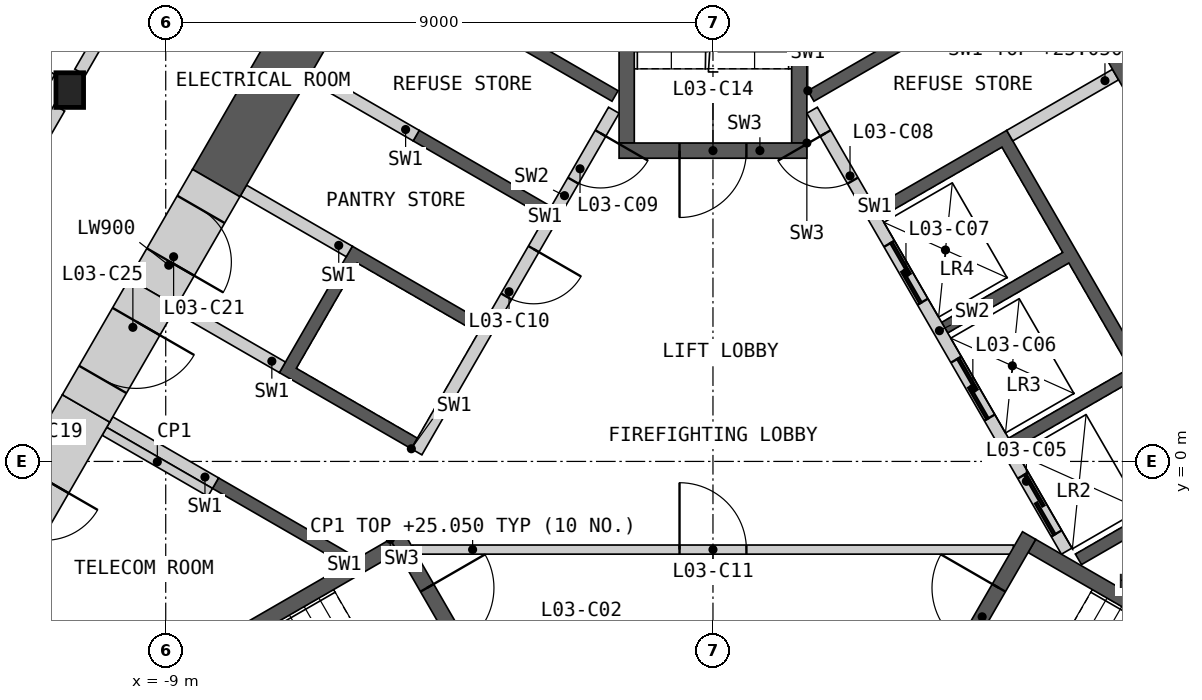
"""IFC4 building model, lengths in metres.
Left out: names, types, materials, properties, quantities, classifications, styles, units other than length and angle.
Written with IfcOpenShell. Run it as: python <this file> out.ifc"""

import sys

from ifc_helpers import new_model, si_unit, direction, frame, frame_2d, origin, origin_2d, place, context, subcontext, project, spatial, polyline, rectangle, i_section, outline, extrude, element, fill, save


model = new_model("IFC4")
c1 = context("Model", 3, precision=1e-05, world=origin(), true_north=direction((0.0, 1.0)))
c2 = subcontext(c1, "Body", "Model", "MODEL_VIEW")
j1 = project(units=[si_unit("LENGTHUNIT", "METRE"), si_unit("PLANEANGLEUNIT", "RADIAN")], contexts=[c1])
p1 = place(None, origin())
s1 = spatial("IfcSite", under=j1, at=p1, CompositionType="ELEMENT")
p2 = place(p1, origin())
s2 = spatial("IfcBuilding", under=s1, at=p2, CompositionType="ELEMENT")
p3 = place(p2, frame((0.0, 0.0, 21.0)))
s3 = spatial("IfcBuildingStorey", under=s2, at=p3, CompositionType="ELEMENT", Elevation=21.0)
p4 = place(p3, frame((-10.578, 6.107, 0.0), z_axis=(0.0, 0.0, 1.0), x_axis=(1.0, 0.0, 0.0)))
e1 = element("IfcColumn", 1, at=p4, inside=s3, PredefinedType="COLUMN", context=c2, shape_type="SweptSolid", body=[
    extrude(i_section(OverallWidth=0.454, OverallDepth=0.57, WebThickness=0.078, FlangeThickness=0.125, at=origin_2d()), origin(), (0.0, 0.0, 1.0), 4.5),
])
p5 = place(p3, origin())
e2 = element("IfcWall", 2, at=p5, inside=s3, PredefinedType="SHEAR", context=c2, shape_type="SweptSolid", body=[
    extrude(outline(polyline([(1.561, 6.097), (3.731, 7.35), (3.831, 7.177), (1.66, 5.924), (1.561, 6.097)])), origin(), (0.0, 0.0, 1.0), 4.05),
])
p6 = place(p3, origin())
e3 = element("IfcWall", 3, at=p6, inside=s3, PredefinedType="SHEAR", context=c2, shape_type="SweptSolid", body=[
    extrude(outline(polyline([(2.66, 4.192), (4.831, 5.445), (8.231, -0.444), (6.061, -1.697), (5.96, -1.524), (7.952, -0.374), (6.952, 1.358), (4.96, 0.208), (4.861, 0.381), (6.852, 1.531), (5.852, 3.263), (3.861, 2.113), (3.76, 2.287), (5.752, 3.437), (4.752, 5.169), (2.76, 4.019), (2.66, 4.192)])), origin(), (0.0, 0.0, 1.0), 4.05),
])
p7 = place(p3, frame((5.817, -1.476, 0.0), z_axis=(0.0, 0.0, 1.0), x_axis=(-0.500002616675, 0.866023893041, 0.0)))
e4 = element("IfcWall", 4, at=p7, inside=s3, PredefinedType="SOLIDWALL", context=c2, shape_type="SweptSolid", body=[
    extrude(rectangle(XDim=8.373, YDim=0.2, at=frame_2d((4.187, 0.0))), origin(), (0.0, 0.0, 1.0), 4.05),
])
p8 = place(p7, frame((0.337, 0.0, 0.0)))
e5 = element("IfcOpeningElement", 5, at=p8, cuts=e4, PredefinedType="OPENING", context=c2, shape_type="SweptSolid", body=[
    extrude(rectangle(XDim=1.1, YDim=2.1, at=frame_2d((0.55, 1.05))), frame((0.0, 0.11, 0.0), z_axis=(0.0, -1.0, 0.0), x_axis=(1.0, 0.0, 0.0)), (0.0, 0.0, 1.0), 0.22),
])
p9 = place(p7, frame((2.537, 0.0, 0.0)))
e6 = element("IfcOpeningElement", 6, at=p9, cuts=e4, PredefinedType="OPENING", context=c2, shape_type="SweptSolid", body=[
    extrude(rectangle(XDim=1.1, YDim=2.1, at=frame_2d((0.55, 1.05))), frame((0.0, 0.11, 0.0), z_axis=(0.0, -1.0, 0.0), x_axis=(1.0, 0.0, 0.0)), (0.0, 0.0, 1.0), 0.22),
])
p10 = place(p7, frame((4.737, 0.0, 0.0)))
e7 = element("IfcOpeningElement", 7, at=p10, cuts=e4, PredefinedType="OPENING", context=c2, shape_type="SweptSolid", body=[
    extrude(rectangle(XDim=1.1, YDim=2.1, at=frame_2d((0.55, 1.05))), frame((0.0, 0.11, 0.0), z_axis=(0.0, -1.0, 0.0), x_axis=(1.0, 0.0, 0.0)), (0.0, 0.0, 1.0), 0.22),
])
p11 = place(p7, frame((7.037, 0.0, 0.0)))
e8 = element("IfcOpeningElement", 8, at=p11, cuts=e4, PredefinedType="OPENING", context=c2, shape_type="SweptSolid", body=[
    extrude(rectangle(XDim=0.9, YDim=2.1, at=frame_2d((0.45, 1.05))), frame((0.0, 0.11, 0.0), z_axis=(0.0, -1.0, 0.0), x_axis=(1.0, 0.0, 0.0)), (0.0, 0.0, 1.0), 0.22),
])
p12 = place(p3, frame((4.881, 5.358, 0.0), z_axis=(0.0, 0.0, 1.0), x_axis=(0.866035824272, 0.499981950752, 0.0)))
e9 = element("IfcWall", 9, at=p12, inside=s3, PredefinedType="SHEAR", context=c2, shape_type="SweptSolid", body=[
    extrude(rectangle(XDim=2.009, YDim=0.2, at=frame_2d((1.004, 0.0))), origin(), (0.0, 0.0, 1.0), 4.05),
])
p13 = place(p3, origin())
e10 = element("IfcWall", 10, at=p13, inside=s3, PredefinedType="SHEAR", context=c2, shape_type="SweptSolid", body=[
    extrude(outline(polyline([(-6.061, -1.697), (-8.231, -0.444), (-8.131, -0.271), (-5.96, -1.524), (-6.061, -1.697)])), origin(), (0.0, 0.0, 1.0), 4.05),
])
p14 = place(p3, origin())
e11 = element("IfcWall", 11, at=p14, inside=s3, PredefinedType="SHEAR", context=c2, shape_type="SweptSolid", body=[
    extrude(outline(polyline([(-4.96, 0.208), (-7.131, 1.461), (-5.931, 3.54), (-3.76, 2.287), (-3.861, 2.113), (-5.852, 3.263), (-6.852, 1.531), (-4.861, 0.381), (-4.96, 0.208)])), origin(), (0.0, 0.0, 1.0), 4.05),
])
p15 = place(p3, origin())
e12 = element("IfcWall", 12, at=p15, inside=s3, PredefinedType="SHEAR", context=c2, shape_type="SweptSolid", body=[
    extrude(outline(polyline([(-2.76, 4.019), (-4.931, 5.272), (-4.831, 5.445), (-2.66, 4.192), (-2.76, 4.019)])), origin(), (0.0, 0.0, 1.0), 4.05),
])
p16 = place(p3, origin())
e13 = element("IfcWall", 13, at=p16, inside=s3, PredefinedType="SHEAR", context=c2, shape_type="SweptSolid", body=[
    extrude(outline(polyline([(-3.731, 7.35), (-1.561, 6.097), (-1.66, 5.924), (-3.831, 7.177), (-3.731, 7.35)])), origin(), (0.0, 0.0, 1.0), 4.05),
])
p17 = place(p3, frame((-1.631, 5.776, 0.0), z_axis=(0.0, 0.0, 1.0), x_axis=(-0.499992876559, -0.866029516466, 0.0)))
e14 = element("IfcWall", 14, at=p17, inside=s3, PredefinedType="SOLIDWALL", context=c2, shape_type="SweptSolid", body=[
    extrude(rectangle(XDim=6.486, YDim=0.2, at=frame_2d((3.243, 0.0))), origin(), (0.0, 0.0, 1.0), 4.05),
])
p18 = place(p17, frame((0.437, 0.0, 0.0)))
e15 = element("IfcOpeningElement", 15, at=p18, cuts=e14, PredefinedType="OPENING", context=c2, shape_type="SweptSolid", body=[
    extrude(rectangle(XDim=0.9, YDim=2.1, at=frame_2d((0.45, 1.05))), frame((0.0, 0.11, 0.0), z_axis=(0.0, -1.0, 0.0), x_axis=(1.0, 0.0, 0.0)), (0.0, 0.0, 1.0), 0.22),
])
p19 = place(p17, frame((2.637, 0.0, 0.0)))
e16 = element("IfcOpeningElement", 16, at=p19, cuts=e14, PredefinedType="OPENING", context=c2, shape_type="SweptSolid", body=[
    extrude(rectangle(XDim=0.9, YDim=2.1, at=frame_2d((0.45, 1.05))), frame((0.0, 0.11, 0.0), z_axis=(0.0, -1.0, 0.0), x_axis=(1.0, 0.0, 0.0)), (0.0, 0.0, 1.0), 0.22),
])
p20 = place(p3, frame((-4.881, 5.358, 0.0), z_axis=(0.0, 0.0, 1.0), x_axis=(-0.866035824272, 0.499981950752, 0.0)))
e17 = element("IfcWall", 17, at=p20, inside=s3, PredefinedType="SHEAR", context=c2, shape_type="SweptSolid", body=[
    extrude(rectangle(XDim=2.009, YDim=0.2, at=frame_2d((1.004, 0.0))), origin(), (0.0, 0.0, 1.0), 4.05),
])
p21 = place(p3, frame((-5.981, 3.453, 0.0), z_axis=(0.0, 0.0, 1.0), x_axis=(-0.866013584312, 0.500020471368, 0.0)))
e18 = element("IfcWall", 18, at=p21, inside=s3, PredefinedType="SHEAR", context=c2, shape_type="SweptSolid", body=[
    extrude(rectangle(XDim=2.009, YDim=0.2, at=frame_2d((1.005, 0.0))), origin(), (0.0, 0.0, 1.0), 4.05),
])
p22 = place(p3, frame((-7.081, 1.548, 0.0), z_axis=(0.0, 0.0, 1.0), x_axis=(-0.865983199114, 0.50007309351, 0.0)))
e19 = element("IfcWall", 19, at=p22, inside=s3, PredefinedType="SHEAR", context=c2, shape_type="SweptSolid", body=[
    extrude(rectangle(XDim=2.009, YDim=0.2, at=frame_2d((1.004, 0.0))), origin(), (0.0, 0.0, 1.0), 4.05),
])
p23 = place(p3, frame((-8.181, -0.357, 0.0), z_axis=(0.0, 0.0, 1.0), x_axis=(-0.866035824272, 0.499981950752, 0.0)))
e20 = element("IfcWall", 20, at=p23, inside=s3, PredefinedType="SHEAR", context=c2, shape_type="SweptSolid", body=[
    extrude(rectangle(XDim=2.009, YDim=0.2, at=frame_2d((1.004, 0.0))), origin(), (0.0, 0.0, 1.0), 4.05),
])
p24 = place(p3, frame((-4.941, -1.45, 0.0), z_axis=(0.0, 0.0, 1.0), x_axis=(1.0, 0.0, 0.0)))
e21 = element("IfcWall", 21, at=p24, inside=s3, PredefinedType="PARTITIONING", context=c2, shape_type="SweptSolid", body=[
    extrude(rectangle(XDim=9.882, YDim=0.15, at=frame_2d((4.941, 0.0))), origin(), (0.0, 0.0, 1.0), 4.05),
])
p25 = place(p24, frame((4.391, 0.0, 0.0)))
e22 = element("IfcOpeningElement", 22, at=p25, cuts=e21, PredefinedType="OPENING", context=c2, shape_type="SweptSolid", body=[
    extrude(rectangle(XDim=1.1, YDim=2.1, at=frame_2d((0.55, 1.05))), frame((0.0, 0.085, 0.0), z_axis=(0.0, -1.0, 0.0), x_axis=(1.0, 0.0, 0.0)), (0.0, 0.0, 1.0), 0.17),
])
p26 = place(p3, origin())
e23 = element("IfcWall", 23, at=p26, inside=s3, PredefinedType="SHEAR", context=c2, shape_type="SweptSolid", body=[
    extrude(outline(polyline([(-5.307, -1.281), (-10.374, -4.206), (-10.032, -4.298), (-5.182, -1.498), (-5.307, -1.281)])), origin(), (0.0, 0.0, 1.0), 4.05),
])
p27 = place(p3, frame((-5.199, -1.219, 0.0), z_axis=(0.0, 0.0, 1.0), x_axis=(0.499982516597, -0.866035497597, 0.0)))
e24 = element("IfcWall", 24, at=p27, inside=s3, PredefinedType="SHEAR", context=c2, shape_type="SweptSolid", body=[
    extrude(rectangle(XDim=3.088, YDim=0.25, at=frame_2d((1.544, 0.0))), origin(), (0.0, 0.0, 1.0), 4.05),
])
p28 = place(p27, frame((0.994, 0.0, 0.0)))
e25 = element("IfcOpeningElement", 25, at=p28, cuts=e24, PredefinedType="OPENING", context=c2, shape_type="SweptSolid", body=[
    extrude(rectangle(XDim=1.1, YDim=2.1, at=frame_2d((0.55, 1.05))), frame((0.0, 0.135, 0.0), z_axis=(0.0, -1.0, 0.0), x_axis=(1.0, 0.0, 0.0)), (0.0, 0.0, 1.0), 0.27),
])
p29 = place(p3, origin())
e26 = element("IfcWall", 26, at=p29, inside=s3, PredefinedType="SHEAR", context=c2, shape_type="SweptSolid", body=[
    extrude(outline(polyline([(10.032, -4.298), (10.374, -4.206), (5.307, -1.281), (5.182, -1.498), (10.032, -4.298)])), origin(), (0.0, 0.0, 1.0), 4.05),
])
p30 = place(p3, frame((3.655, -3.893, 0.0), z_axis=(0.0, 0.0, 1.0), x_axis=(0.499982516597, 0.866035497597, 0.0)))
e27 = element("IfcWall", 27, at=p30, inside=s3, PredefinedType="SHEAR", context=c2, shape_type="SweptSolid", body=[
    extrude(rectangle(XDim=3.088, YDim=0.25, at=frame_2d((1.544, 0.0))), origin(), (0.0, 0.0, 1.0), 4.05),
])
p31 = place(p30, frame((0.994, 0.0, 0.0)))
e28 = element("IfcOpeningElement", 28, at=p31, cuts=e27, PredefinedType="OPENING", context=c2, shape_type="SweptSolid", body=[
    extrude(rectangle(XDim=1.1, YDim=2.1, at=frame_2d((0.55, 1.05))), frame((0.0, 0.135, 0.0), z_axis=(0.0, -1.0, 0.0), x_axis=(1.0, 0.0, 0.0)), (0.0, 0.0, 1.0), 0.27),
])
p32 = place(p3, origin())
e29 = element("IfcWall", 29, at=p32, inside=s3, PredefinedType="SHEAR", context=c2, shape_type="SweptSolid", body=[
    extrude(outline(polyline([(1.544, 5.237), (1.544, 11.087), (1.294, 10.837), (1.294, 5.237), (1.544, 5.237)])), origin(), (0.0, 0.0, 1.0), 4.05),
])
p33 = place(p3, origin())
e30 = element("IfcWall", 30, at=p33, inside=s3, PredefinedType="SHEAR", context=c2, shape_type="SweptSolid", body=[
    extrude(outline(polyline([(-1.294, 10.837), (-1.544, 11.087), (-1.544, 5.237), (-1.294, 5.237), (-1.294, 10.837)])), origin(), (0.0, 0.0, 1.0), 4.05),
])
p34 = place(p3, frame((1.544, 5.112, 0.0), z_axis=(0.0, 0.0, 1.0), x_axis=(-1.0, 0.0, 0.0)))
e31 = element("IfcWall", 31, at=p34, inside=s3, PredefinedType="SHEAR", context=c2, shape_type="SweptSolid", body=[
    extrude(rectangle(XDim=3.088, YDim=0.25, at=frame_2d((1.544, 0.0))), origin(), (0.0, 0.0, 1.0), 4.05),
])
p35 = place(p34, frame((0.994, 0.0, 0.0)))
e32 = element("IfcOpeningElement", 32, at=p35, cuts=e31, PredefinedType="OPENING", context=c2, shape_type="SweptSolid", body=[
    extrude(rectangle(XDim=1.1, YDim=2.1, at=frame_2d((0.55, 1.05))), frame((0.0, 0.135, 0.0), z_axis=(0.0, -1.0, 0.0), x_axis=(1.0, 0.0, 0.0)), (0.0, 0.0, 1.0), 0.27),
])
p36 = place(p3, frame((-8.268, -0.509, 0.0), z_axis=(0.0, 0.0, 1.0), x_axis=(-0.866035824272, 0.499981950752, 0.0)))
e33 = element("IfcWall", 33, at=p36, inside=s3, PredefinedType="PARTITIONING", context=c2, shape_type="SweptSolid", body=[
    extrude(rectangle(XDim=2.009, YDim=0.15, at=frame_2d((1.004, 0.0))), origin(), (0.0, 0.0, 1.0), 4.05),
])
p37 = place(p3, frame((-11.664, -2.373, 0.0), z_axis=(0.0, 0.0, 1.0), x_axis=(0.866075643493, -0.499912972175, 0.0)))
e34 = element("IfcWall", 34, at=p37, inside=s3, PredefinedType="PARTITIONING", context=c2, shape_type="SweptSolid", body=[
    extrude(rectangle(XDim=2.588, YDim=0.15, at=frame_2d((1.294, 0.0))), origin(), (0.0, 0.0, 1.0), 4.05),
])
p38 = place(p3, frame((9.561, 2.169, 0.0), z_axis=(0.0, 0.0, 1.0), x_axis=(-0.499995114243, 0.866028224559, 0.0)))
e35 = element("IfcWall", 35, at=p38, inside=s3, PredefinedType="SHEAR", context=c2, shape_type="SweptSolid", body=[
    extrude(rectangle(XDim=7.906, YDim=0.9, at=frame_2d((3.953, 0.0))), origin(), (0.0, 0.0, 1.0), 4.05),
])
p39 = place(p3, frame((-4.466, 10.995, 0.0), z_axis=(0.0, 0.0, 1.0), x_axis=(-0.500012427149, -0.866018228848, 0.0)))
e36 = element("IfcWall", 36, at=p39, inside=s3, PredefinedType="SHEAR", context=c2, shape_type="SweptSolid", body=[
    extrude(rectangle(XDim=7.409, YDim=0.9, at=frame_2d((3.705, 0.0))), origin(), (0.0, 0.0, 1.0), 4.05),
])
p40 = place(p3, frame((-10.31, 0.872, 0.0), z_axis=(0.0, 0.0, 1.0), x_axis=(-0.499982003349, -0.866035793907, 0.0)))
e37 = element("IfcWall", 37, at=p40, inside=s3, PredefinedType="SHEAR", context=c2, shape_type="SweptSolid", body=[
    extrude(rectangle(XDim=2.931, YDim=0.9, at=frame_2d((1.466, 0.0))), origin(), (0.0, 0.0, 1.0), 4.05),
])
p41 = place(p40, frame((1.35, 0.0, 0.0)))
e38 = element("IfcOpeningElement", 38, at=p41, cuts=e37, PredefinedType="OPENING", context=c2, shape_type="SweptSolid", body=[
    extrude(rectangle(XDim=1.0, YDim=2.1, at=frame_2d((0.5, 1.05))), frame((0.0, 0.46, 0.0), z_axis=(0.0, -1.0, 0.0), x_axis=(1.0, 0.0, 0.0)), (0.0, 0.0, 1.0), 0.92),
])
p42 = place(p3, frame((-8.17, 4.579, 0.0), z_axis=(0.0, 0.0, 1.0), x_axis=(-0.499888406853, -0.866089822532, 0.0)))
e39 = element("IfcWall", 39, at=p42, inside=s3, PredefinedType="SHEAR", context=c2, shape_type="SweptSolid", body=[
    extrude(rectangle(XDim=2.08, YDim=0.9, at=frame_2d((1.04, 0.0))), origin(), (0.0, 0.0, 1.0), 4.05),
])
p43 = place(p42, frame((0.5, 0.0, 0.0)))
e40 = element("IfcOpeningElement", 40, at=p43, cuts=e39, PredefinedType="OPENING", context=c2, shape_type="SweptSolid", body=[
    extrude(rectangle(XDim=1.0, YDim=2.1, at=frame_2d((0.5, 1.05))), frame((0.0, 0.46, 0.0), z_axis=(0.0, -1.0, 0.0), x_axis=(1.0, 0.0, 0.0)), (0.0, 0.0, 1.0), 0.92),
])
p44 = place(p3, frame((-9.21, 2.777, 0.0), z_axis=(0.0, 0.0, 1.0), x_axis=(-0.500077893725, -0.86598042715, 0.0)))
e41 = element("IfcWall", 41, at=p44, inside=s3, PredefinedType="SHEAR", context=c2, shape_type="SweptSolid", body=[
    extrude(rectangle(XDim=2.2, YDim=0.9, at=frame_2d((1.1, 0.0))), origin(), (0.0, 0.0, 1.0), 4.05),
])
p45 = place(p44, frame((0.55, 0.0, 0.0)))
e42 = element("IfcOpeningElement", 42, at=p45, cuts=e41, PredefinedType="OPENING", context=c2, shape_type="SweptSolid", body=[
    extrude(rectangle(XDim=1.1, YDim=2.1, at=frame_2d((0.55, 1.05))), frame((0.0, 0.46, 0.0), z_axis=(0.0, -1.0, 0.0), x_axis=(1.0, 0.0, 0.0)), (0.0, 0.0, 1.0), 0.92),
])
p46 = place(p3, frame((-15.698, -2.759, 0.0), z_axis=(0.0, 0.0, 1.0), x_axis=(0.500004292778, 0.866022925334, 0.0)))
e43 = element("IfcWall", 43, at=p46, inside=s3, PredefinedType="PARTITIONING", context=c2, shape_type="SweptSolid", body=[
    extrude(rectangle(XDim=9.898, YDim=0.2, at=frame_2d((4.949, 0.0))), origin(), (0.0, 0.0, 1.0), 4.05),
])
p47 = place(p46, frame((4.1, 0.0, 0.0)))
e44 = element("IfcOpeningElement", 44, at=p47, cuts=e43, PredefinedType="OPENING", context=c2, shape_type="SweptSolid", body=[
    extrude(rectangle(XDim=1.8, YDim=2.1, at=frame_2d((0.9, 1.05))), frame((0.0, 0.11, 0.0), z_axis=(0.0, -1.0, 0.0), x_axis=(1.0, 0.0, 0.0)), (0.0, 0.0, 1.0), 0.22),
])
p48 = place(p3, frame((5.459, 14.974, 0.0), z_axis=(0.0, 0.0, 1.0), x_axis=(0.499985793049, -0.866033606016, 0.0)))
e45 = element("IfcWall", 45, at=p48, inside=s3, PredefinedType="PARTITIONING", context=c2, shape_type="SweptSolid", body=[
    extrude(rectangle(XDim=9.898, YDim=0.2, at=frame_2d((4.949, 0.0))), origin(), (0.0, 0.0, 1.0), 4.05),
])
p49 = place(p48, frame((3.998, 0.0, 0.0)))
e46 = element("IfcOpeningElement", 46, at=p49, cuts=e45, PredefinedType="OPENING", context=c2, shape_type="SweptSolid", body=[
    extrude(rectangle(XDim=1.8, YDim=2.1, at=frame_2d((0.9, 1.05))), frame((0.0, 0.11, 0.0), z_axis=(0.0, -1.0, 0.0), x_axis=(1.0, 0.0, 0.0)), (0.0, 0.0, 1.0), 0.22),
])
p50 = place(p3, frame((-10.408, 6.402, 0.0), z_axis=(0.0, 0.0, 1.0), x_axis=(0.499986904098, 0.866032964575, 0.0)))
e47 = element("IfcWall", 47, at=p50, inside=s3, PredefinedType="PARTITIONING", context=c2, shape_type="SweptSolid", body=[
    extrude(rectangle(XDim=9.67, YDim=0.2, at=frame_2d((4.835, 0.0))), origin(), (0.0, 0.0, 1.0), 4.05),
])
p51 = place(p50, frame((3.884, 0.0, 0.0)))
e48 = element("IfcOpeningElement", 48, at=p51, cuts=e47, PredefinedType="OPENING", context=c2, shape_type="SweptSolid", body=[
    extrude(rectangle(XDim=1.8, YDim=2.1, at=frame_2d((0.9, 1.05))), frame((0.0, 0.11, 0.0), z_axis=(0.0, -1.0, 0.0), x_axis=(1.0, 0.0, 0.0)), (0.0, 0.0, 1.0), 0.22),
])
p52 = place(p3, frame((-19.31, 11.148, 0.0), z_axis=(0.0, 0.0, 1.0), x_axis=(0.866029077831, -0.499993636311, 0.0)))
e49 = element("IfcWall", 49, at=p52, inside=s3, PredefinedType="PARTITIONING", context=c2, shape_type="SweptSolid", body=[
    extrude(rectangle(XDim=9.741, YDim=0.2, at=frame_2d((4.871, 0.0))), origin(), (0.0, 0.0, 1.0), 4.05),
])
p53 = place(p8, origin())
e50 = element("IfcDoor", 50, at=p53, inside=s3, OperationType="SLIDING_TO_LEFT", PredefinedType="DOOR", context=c2, shape_type="SweptSolid", body=[
    extrude(rectangle(XDim=1.1, YDim=2.1, at=frame_2d((0.55, 1.05))), frame((0.0, 0.025, 0.0), z_axis=(0.0, -1.0, 0.0), x_axis=(1.0, 0.0, 0.0)), (0.0, 0.0, 1.0), 0.05),
])
fill(e5, e50)
p54 = place(p9, origin())
e51 = element("IfcDoor", 51, at=p54, inside=s3, OperationType="SLIDING_TO_LEFT", PredefinedType="DOOR", context=c2, shape_type="SweptSolid", body=[
    extrude(rectangle(XDim=1.1, YDim=2.1, at=frame_2d((0.55, 1.05))), frame((0.0, 0.025, 0.0), z_axis=(0.0, -1.0, 0.0), x_axis=(1.0, 0.0, 0.0)), (0.0, 0.0, 1.0), 0.05),
])
fill(e6, e51)
p55 = place(p10, origin())
e52 = element("IfcDoor", 52, at=p55, inside=s3, OperationType="SLIDING_TO_LEFT", PredefinedType="DOOR", context=c2, shape_type="SweptSolid", body=[
    extrude(rectangle(XDim=1.1, YDim=2.1, at=frame_2d((0.55, 1.05))), frame((0.0, 0.025, 0.0), z_axis=(0.0, -1.0, 0.0), x_axis=(1.0, 0.0, 0.0)), (0.0, 0.0, 1.0), 0.05),
])
fill(e7, e52)
p56 = place(p11, origin())
e53 = element("IfcDoor", 53, at=p56, inside=s3, OperationType="SINGLE_SWING_RIGHT", PredefinedType="DOOR", context=c2, shape_type="SweptSolid", body=[
    extrude(rectangle(XDim=0.9, YDim=2.1, at=frame_2d((0.45, 1.05))), frame((0.0, 0.025, 0.0), z_axis=(0.0, -1.0, 0.0), x_axis=(1.0, 0.0, 0.0)), (0.0, 0.0, 1.0), 0.05),
])
fill(e8, e53)
p57 = place(p18, origin())
e54 = element("IfcDoor", 54, at=p57, inside=s3, OperationType="SINGLE_SWING_LEFT", PredefinedType="DOOR", context=c2, shape_type="SweptSolid", body=[
    extrude(rectangle(XDim=0.9, YDim=2.1, at=frame_2d((0.45, 1.05))), frame((0.0, 0.025, 0.0), z_axis=(0.0, -1.0, 0.0), x_axis=(1.0, 0.0, 0.0)), (0.0, 0.0, 1.0), 0.05),
])
fill(e15, e54)
p58 = place(p19, origin())
e55 = element("IfcDoor", 55, at=p58, inside=s3, OperationType="SINGLE_SWING_LEFT", PredefinedType="DOOR", context=c2, shape_type="SweptSolid", body=[
    extrude(rectangle(XDim=0.9, YDim=2.1, at=frame_2d((0.45, 1.05))), frame((0.0, 0.025, 0.0), z_axis=(0.0, -1.0, 0.0), x_axis=(1.0, 0.0, 0.0)), (0.0, 0.0, 1.0), 0.05),
])
fill(e16, e55)
p59 = place(p25, origin())
e56 = element("IfcDoor", 56, at=p59, inside=s3, OperationType="SINGLE_SWING_LEFT", PredefinedType="DOOR", context=c2, shape_type="SweptSolid", body=[
    extrude(rectangle(XDim=1.1, YDim=2.1, at=frame_2d((0.55, 1.05))), frame((0.0, 0.025, 0.0), z_axis=(0.0, -1.0, 0.0), x_axis=(1.0, 0.0, 0.0)), (0.0, 0.0, 1.0), 0.05),
])
fill(e22, e56)
p60 = place(p28, origin())
e57 = element("IfcDoor", 57, at=p60, inside=s3, OperationType="SINGLE_SWING_LEFT", PredefinedType="DOOR", context=c2, shape_type="SweptSolid", body=[
    extrude(rectangle(XDim=1.1, YDim=2.1, at=frame_2d((0.55, 1.05))), frame((0.0, 0.025, 0.0), z_axis=(0.0, -1.0, 0.0), x_axis=(1.0, 0.0, 0.0)), (0.0, 0.0, 1.0), 0.05),
])
fill(e25, e57)
p61 = place(p31, origin())
e58 = element("IfcDoor", 58, at=p61, inside=s3, OperationType="SINGLE_SWING_RIGHT", PredefinedType="DOOR", context=c2, shape_type="SweptSolid", body=[
    extrude(rectangle(XDim=1.1, YDim=2.1, at=frame_2d((0.55, 1.05))), frame((0.0, 0.025, 0.0), z_axis=(0.0, -1.0, 0.0), x_axis=(1.0, 0.0, 0.0)), (0.0, 0.0, 1.0), 0.05),
])
fill(e28, e58)
p62 = place(p35, origin())
e59 = element("IfcDoor", 59, at=p62, inside=s3, OperationType="SINGLE_SWING_RIGHT", PredefinedType="DOOR", context=c2, shape_type="SweptSolid", body=[
    extrude(rectangle(XDim=1.1, YDim=2.1, at=frame_2d((0.55, 1.05))), frame((0.0, 0.025, 0.0), z_axis=(0.0, -1.0, 0.0), x_axis=(1.0, 0.0, 0.0)), (0.0, 0.0, 1.0), 0.05),
])
fill(e32, e59)
p63 = place(p41, origin())
e60 = element("IfcDoor", 60, at=p63, inside=s3, OperationType="SINGLE_SWING_LEFT", PredefinedType="DOOR", context=c2, shape_type="SweptSolid", body=[
    extrude(rectangle(XDim=1.0, YDim=2.1, at=frame_2d((0.5, 1.05))), frame((0.0, 0.205, 0.0), z_axis=(0.0, -1.0, 0.0), x_axis=(1.0, 0.0, 0.0)), (0.0, 0.0, 1.0), 0.05),
])
fill(e38, e60)
p64 = place(p43, origin())
e61 = element("IfcDoor", 61, at=p64, inside=s3, OperationType="SINGLE_SWING_RIGHT", PredefinedType="DOOR", context=c2, shape_type="SweptSolid", body=[
    extrude(rectangle(XDim=1.0, YDim=2.1, at=frame_2d((0.5, 1.05))), frame((0.0, 0.205, 0.0), z_axis=(0.0, -1.0, 0.0), x_axis=(1.0, 0.0, 0.0)), (0.0, 0.0, 1.0), 0.05),
])
fill(e40, e61)
p65 = place(p45, origin())
e62 = element("IfcDoor", 62, at=p65, inside=s3, OperationType="SINGLE_SWING_LEFT", PredefinedType="DOOR", context=c2, shape_type="SweptSolid", body=[
    extrude(rectangle(XDim=1.1, YDim=2.1, at=frame_2d((0.55, 1.05))), frame((0.0, 0.205, 0.0), z_axis=(0.0, -1.0, 0.0), x_axis=(1.0, 0.0, 0.0)), (0.0, 0.0, 1.0), 0.05),
])
fill(e42, e62)
save(model, sys.argv[1])
